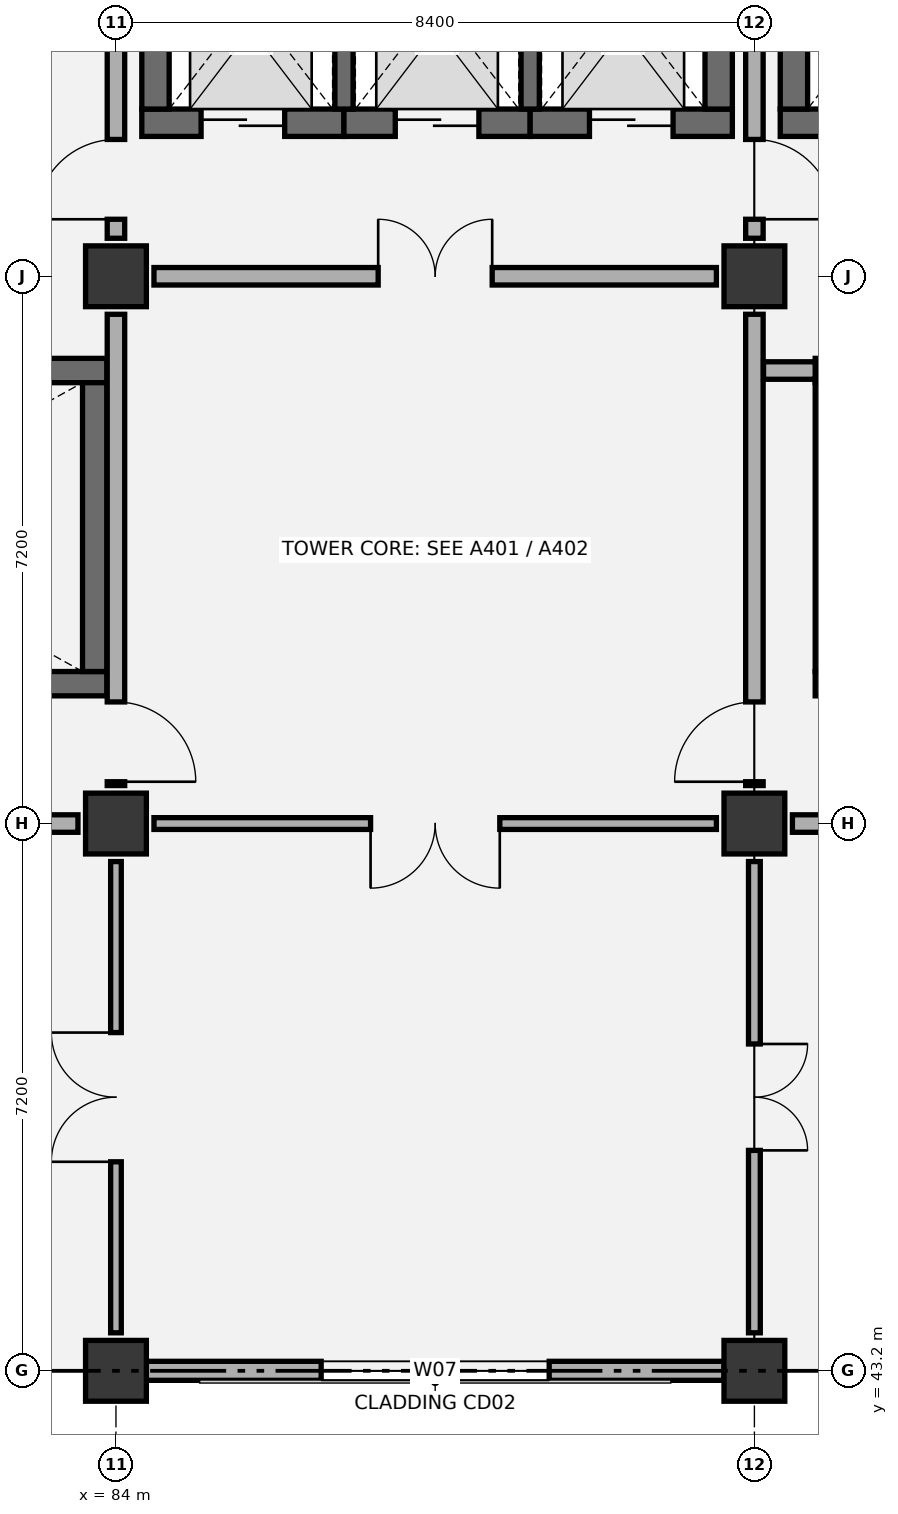
"""IFC4 building model, lengths in metres.
Left out: names, types, materials, properties, quantities, classifications, styles, units other than length and angle.
Written with IfcOpenShell. Run it as: python <this file> out.ifc"""

import sys

from ifc_helpers import new_model, si_unit, direction, frame, frame_2d, origin, origin_2d, place, context, subcontext, project, spatial, rectangle, extrude, element, fill, save


model = new_model("IFC4")
c1 = context("Model", 3, precision=1e-05, world=origin(), true_north=direction((0.0, 1.0)))
c2 = subcontext(c1, "Body", "Model", "MODEL_VIEW")
j1 = project(units=[si_unit("LENGTHUNIT", "METRE"), si_unit("PLANEANGLEUNIT", "RADIAN")], contexts=[c1])
p1 = place(None, origin())
s1 = spatial("IfcSite", under=j1, at=p1, CompositionType="ELEMENT")
p2 = place(p1, origin())
s2 = spatial("IfcBuilding", under=s1, at=p2, CompositionType="ELEMENT")
p3 = place(p2, frame((0.0, 0.0, 11.4)))
s3 = spatial("IfcBuildingStorey", under=s2, at=p3, CompositionType="ELEMENT", Elevation=11.4)
for number, where, z_axis, x_axis in (
    (1, (84.0, 43.2, 0.0), (0.0, 0.0, 1.0), (1.0, 0.0, 0.0)),
    (2, (84.0, 50.4, 0.0), (0.0, 0.0, 1.0), (1.0, 0.0, 0.0)),
    (3, (84.0, 57.6, 0.0), (0.0, 0.0, 1.0), (1.0, 0.0, 0.0)),
    (4, (92.4, 43.2, 0.0), (0.0, 0.0, 1.0), (1.0, 0.0, 0.0)),
    (5, (92.4, 50.4, 0.0), (0.0, 0.0, 1.0), (1.0, 0.0, 0.0)),
    (6, (92.4, 57.6, 0.0), (0.0, 0.0, 1.0), (1.0, 0.0, 0.0)),
):
    element("IfcColumn", number, at=place(p3, frame(where, z_axis=z_axis, x_axis=x_axis)), inside=s3, PredefinedType="COLUMN", context=c2, shape_type="SweptSolid", body=[
        extrude(rectangle(XDim=0.8, YDim=0.8, at=origin_2d()), origin(), (0.0, 0.0, 1.0), 5.4),
    ])
p4 = place(p3, frame((76.4, 52.24, 0.0), z_axis=(0.0, 0.0, 1.0), x_axis=(1.0, 0.0, 0.0)))
e7 = element("IfcWall", 7, at=p4, inside=s3, PredefinedType="SHEAR", context=c2, shape_type="SweptSolid", body=[
    extrude(rectangle(XDim=7.48, YDim=0.32, at=frame_2d((3.74, 0.0))), origin(), (0.0, 0.0, 1.0), 5.1),
])
p5 = place(p4, frame((0.45, 0.0, 0.0)))
e8 = element("IfcOpeningElement", 8, at=p5, cuts=e7, PredefinedType="OPENING", context=c2, shape_type="SweptSolid", body=[
    extrude(rectangle(XDim=1.05, YDim=2.15, at=frame_2d((0.525, 1.075))), frame((0.0, 0.17, 0.0), z_axis=(0.0, -1.0, 0.0), x_axis=(1.0, 0.0, 0.0)), (0.0, 0.0, 1.0), 0.34),
])
p6 = place(p3, frame((76.4, 56.36, 0.0), z_axis=(0.0, 0.0, 1.0), x_axis=(1.0, 0.0, 0.0)))
e9 = element("IfcWall", 9, at=p6, inside=s3, PredefinedType="SHEAR", context=c2, shape_type="SweptSolid", body=[
    extrude(rectangle(XDim=7.48, YDim=0.32, at=frame_2d((3.74, 0.0))), origin(), (0.0, 0.0, 1.0), 5.1),
])
p7 = place(p3, frame((83.72, 52.4, 0.0), z_axis=(0.0, 0.0, 1.0), x_axis=(0.0, 1.0, 0.0)))
e10 = element("IfcWall", 10, at=p7, inside=s3, PredefinedType="SHEAR", context=c2, shape_type="SweptSolid", body=[
    extrude(rectangle(XDim=3.8, YDim=0.32, at=frame_2d((1.9, 0.0))), origin(), (0.0, 0.0, 1.0), 5.1),
])
p8 = place(p3, frame((93.2, 52.24, 0.0), z_axis=(0.0, 0.0, 1.0), x_axis=(1.0, 0.0, 0.0)))
e11 = element("IfcWall", 11, at=p8, inside=s3, PredefinedType="SHEAR", context=c2, shape_type="SweptSolid", body=[
    extrude(rectangle(XDim=7.48, YDim=0.32, at=frame_2d((3.74, 0.0))), origin(), (0.0, 0.0, 1.0), 5.1),
])
p9 = place(p8, frame((0.45, 0.0, 0.0)))
e12 = element("IfcOpeningElement", 12, at=p9, cuts=e11, PredefinedType="OPENING", context=c2, shape_type="SweptSolid", body=[
    extrude(rectangle(XDim=1.05, YDim=2.15, at=frame_2d((0.525, 1.075))), frame((0.0, 0.17, 0.0), z_axis=(0.0, -1.0, 0.0), x_axis=(1.0, 0.0, 0.0)), (0.0, 0.0, 1.0), 0.34),
])
p10 = place(p3, frame((93.2, 56.36, 0.0), z_axis=(0.0, 0.0, 1.0), x_axis=(1.0, 0.0, 0.0)))
e13 = element("IfcWall", 13, at=p10, inside=s3, PredefinedType="SHEAR", context=c2, shape_type="SweptSolid", body=[
    extrude(rectangle(XDim=7.48, YDim=0.32, at=frame_2d((3.74, 0.0))), origin(), (0.0, 0.0, 1.0), 5.1),
])
p11 = place(p3, frame((93.36, 52.4, 0.0), z_axis=(0.0, 0.0, 1.0), x_axis=(0.0, 1.0, 0.0)))
e14 = element("IfcWall", 14, at=p11, inside=s3, PredefinedType="SHEAR", context=c2, shape_type="SweptSolid", body=[
    extrude(rectangle(XDim=3.8, YDim=0.32, at=frame_2d((1.9, 0.0))), origin(), (0.0, 0.0, 1.0), 5.1),
])
p12 = place(p3, frame((84.34, 59.62, 0.0), z_axis=(0.0, 0.0, 1.0), x_axis=(1.0, 0.0, 0.0)))
e15 = element("IfcWall", 15, at=p12, inside=s3, PredefinedType="SHEAR", context=c2, shape_type="SweptSolid", body=[
    extrude(rectangle(XDim=2.66, YDim=0.36, at=frame_2d((1.33, 0.0))), origin(), (0.0, 0.0, 1.0), 5.1),
])
p13 = place(p12, frame((0.78, 0.0, 0.0)))
e16 = element("IfcOpeningElement", 16, at=p13, cuts=e15, PredefinedType="OPENING", context=c2, shape_type="SweptSolid", body=[
    extrude(rectangle(XDim=1.1, YDim=2.15, at=frame_2d((0.55, 1.075))), frame((0.0, 0.19, 0.0), z_axis=(0.0, -1.0, 0.0), x_axis=(1.0, 0.0, 0.0)), (0.0, 0.0, 1.0), 0.38),
])
p14 = place(p3, frame((87.0, 59.62, 0.0), z_axis=(0.0, 0.0, 1.0), x_axis=(1.0, 0.0, 0.0)))
e17 = element("IfcWall", 17, at=p14, inside=s3, PredefinedType="SHEAR", context=c2, shape_type="SweptSolid", body=[
    extrude(rectangle(XDim=2.45, YDim=0.36, at=frame_2d((1.225, 0.0))), origin(), (0.0, 0.0, 1.0), 5.1),
])
p15 = place(p14, frame((0.675, 0.0, 0.0)))
e18 = element("IfcOpeningElement", 18, at=p15, cuts=e17, PredefinedType="OPENING", context=c2, shape_type="SweptSolid", body=[
    extrude(rectangle(XDim=1.1, YDim=2.15, at=frame_2d((0.55, 1.075))), frame((0.0, 0.19, 0.0), z_axis=(0.0, -1.0, 0.0), x_axis=(1.0, 0.0, 0.0)), (0.0, 0.0, 1.0), 0.38),
])
p16 = place(p3, frame((89.45, 59.62, 0.0), z_axis=(0.0, 0.0, 1.0), x_axis=(1.0, 0.0, 0.0)))
e19 = element("IfcWall", 19, at=p16, inside=s3, PredefinedType="SHEAR", context=c2, shape_type="SweptSolid", body=[
    extrude(rectangle(XDim=2.66, YDim=0.36, at=frame_2d((1.33, 0.0))), origin(), (0.0, 0.0, 1.0), 5.1),
])
p17 = place(p16, frame((0.78, 0.0, 0.0)))
e20 = element("IfcOpeningElement", 20, at=p17, cuts=e19, PredefinedType="OPENING", context=c2, shape_type="SweptSolid", body=[
    extrude(rectangle(XDim=1.1, YDim=2.15, at=frame_2d((0.55, 1.075))), frame((0.0, 0.19, 0.0), z_axis=(0.0, -1.0, 0.0), x_axis=(1.0, 0.0, 0.0)), (0.0, 0.0, 1.0), 0.38),
])
for number, where, z_axis, x_axis in (
    (21, (84.52, 59.8, 0.0), (0.0, 0.0, 1.0), (0.0, 1.0, 0.0)),
    (22, (91.93, 59.8, 0.0), (0.0, 0.0, 1.0), (0.0, 1.0, 0.0)),
):
    element("IfcWall", number, at=place(p3, frame(where, z_axis=z_axis, x_axis=x_axis)), inside=s3, PredefinedType="SHEAR", context=c2, shape_type="SweptSolid", body=[
        extrude(rectangle(XDim=2.8, YDim=0.36, at=frame_2d((1.4, 0.0))), origin(), (0.0, 0.0, 1.0), 5.1),
    ])
for number, where, z_axis, x_axis in (
    (23, (87.0, 59.8, 0.0), (0.0, 0.0, 1.0), (0.0, 1.0, 0.0)),
    (24, (89.45, 59.8, 0.0), (0.0, 0.0, 1.0), (0.0, 1.0, 0.0)),
):
    element("IfcWall", number, at=place(p3, frame(where, z_axis=z_axis, x_axis=x_axis)), inside=s3, PredefinedType="SHEAR", context=c2, shape_type="SweptSolid", body=[
        extrude(rectangle(XDim=2.8, YDim=0.24, at=frame_2d((1.4, 0.0))), origin(), (0.0, 0.0, 1.0), 5.1),
    ])
p18 = place(p3, frame((92.74, 59.62, 0.0), z_axis=(0.0, 0.0, 1.0), x_axis=(1.0, 0.0, 0.0)))
e25 = element("IfcWall", 25, at=p18, inside=s3, PredefinedType="SHEAR", context=c2, shape_type="SweptSolid", body=[
    extrude(rectangle(XDim=2.87, YDim=0.36, at=frame_2d((1.435, 0.0))), origin(), (0.0, 0.0, 1.0), 5.1),
])
p19 = place(p18, frame((0.76, 0.0, 0.0)))
e26 = element("IfcOpeningElement", 26, at=p19, cuts=e25, PredefinedType="OPENING", context=c2, shape_type="SweptSolid", body=[
    extrude(rectangle(XDim=1.35, YDim=2.2, at=frame_2d((0.675, 1.1))), frame((0.0, 0.19, 0.0), z_axis=(0.0, -1.0, 0.0), x_axis=(1.0, 0.0, 0.0)), (0.0, 0.0, 1.0), 0.38),
])
p20 = place(p3, frame((92.92, 59.8, 0.0), z_axis=(0.0, 0.0, 1.0), x_axis=(0.0, 1.0, 0.0)))
e27 = element("IfcWall", 27, at=p20, inside=s3, PredefinedType="SHEAR", context=c2, shape_type="SweptSolid", body=[
    extrude(rectangle(XDim=2.8, YDim=0.36, at=frame_2d((1.4, 0.0))), origin(), (0.0, 0.0, 1.0), 5.1),
])
p21 = place(p3, frame((84.4, 43.2, 0.0), z_axis=(0.0, 0.0, 1.0), x_axis=(1.0, 0.0, 0.0)))
e28 = element("IfcWall", 28, at=p21, inside=s3, PredefinedType="SOLIDWALL", context=c2, shape_type="SweptSolid", body=[
    extrude(rectangle(XDim=7.6, YDim=0.25, at=frame_2d((3.8, 0.0))), origin(), (0.0, 0.0, 1.0), 4.445),
])
p22 = place(p21, frame((2.3, 0.0, 0.9)))
e29 = element("IfcOpeningElement", 29, at=p22, cuts=e28, PredefinedType="OPENING", context=c2, shape_type="SweptSolid", body=[
    extrude(rectangle(XDim=3.0, YDim=2.1, at=frame_2d((1.5, 1.05))), frame((0.0, 0.135, 0.0), z_axis=(0.0, -1.0, 0.0), x_axis=(1.0, 0.0, 0.0)), (0.0, 0.0, 1.0), 0.27),
])
p23 = place(p3, frame((84.0, 43.7, 0.0), z_axis=(0.0, 0.0, 1.0), x_axis=(0.0, 1.0, 0.0)))
e30 = element("IfcWall", 30, at=p23, inside=s3, PredefinedType="PARTITIONING", context=c2, shape_type="SweptSolid", body=[
    extrude(rectangle(XDim=6.2, YDim=0.14, at=frame_2d((3.1, 0.0))), origin(), (0.0, 0.0, 1.0), 4.695),
])
p24 = place(p23, frame((2.25, 0.0, 0.0)))
e31 = element("IfcOpeningElement", 31, at=p24, cuts=e30, PredefinedType="OPENING", context=c2, shape_type="SweptSolid", body=[
    extrude(rectangle(XDim=1.7, YDim=2.25, at=frame_2d((0.85, 1.125))), frame((0.0, 0.08, 0.0), z_axis=(0.0, -1.0, 0.0), x_axis=(1.0, 0.0, 0.0)), (0.0, 0.0, 1.0), 0.16),
])
p25 = place(p3, frame((76.1, 50.4, 0.0), z_axis=(0.0, 0.0, 1.0), x_axis=(1.0, 0.0, 0.0)))
e32 = element("IfcWall", 32, at=p25, inside=s3, PredefinedType="PARTITIONING", context=c2, shape_type="SweptSolid", body=[
    extrude(rectangle(XDim=7.4, YDim=0.23, at=frame_2d((3.7, 0.0))), origin(), (0.0, 0.0, 1.0), 4.345),
])
p26 = place(p25, frame((2.95, 0.0, 0.0)))
e33 = element("IfcOpeningElement", 33, at=p26, cuts=e32, PredefinedType="OPENING", context=c2, shape_type="SweptSolid", body=[
    extrude(rectangle(XDim=1.5, YDim=2.15, at=frame_2d((0.75, 1.075))), frame((0.0, 0.125, 0.0), z_axis=(0.0, -1.0, 0.0), x_axis=(1.0, 0.0, 0.0)), (0.0, 0.0, 1.0), 0.25),
])
p27 = place(p3, frame((84.0, 50.9, 0.0), z_axis=(0.0, 0.0, 1.0), x_axis=(0.0, 1.0, 0.0)))
e34 = element("IfcWall", 34, at=p27, inside=s3, PredefinedType="PARTITIONING", context=c2, shape_type="SweptSolid", body=[
    extrude(rectangle(XDim=6.2, YDim=0.23, at=frame_2d((3.1, 0.0))), origin(), (0.0, 0.0, 1.0), 4.395),
])
p28 = place(p27, frame((0.05, 0.0, 0.0)))
e35 = element("IfcOpeningElement", 35, at=p28, cuts=e34, PredefinedType="OPENING", context=c2, shape_type="SweptSolid", body=[
    extrude(rectangle(XDim=1.05, YDim=2.15, at=frame_2d((0.525, 1.075))), frame((0.0, 0.125, 0.0), z_axis=(0.0, -1.0, 0.0), x_axis=(1.0, 0.0, 0.0)), (0.0, 0.0, 1.0), 0.25),
])
p29 = place(p3, frame((84.0, 58.1, 0.0), z_axis=(0.0, 0.0, 1.0), x_axis=(0.0, 1.0, 0.0)))
e36 = element("IfcWall", 36, at=p29, inside=s3, PredefinedType="PARTITIONING", context=c2, shape_type="SweptSolid", body=[
    extrude(rectangle(XDim=6.2, YDim=0.23, at=frame_2d((3.1, 0.0))), origin(), (0.0, 0.0, 1.0), 4.805),
])
p30 = place(p29, frame((0.25, 0.0, 0.0)))
e37 = element("IfcOpeningElement", 37, at=p30, cuts=e36, PredefinedType="OPENING", context=c2, shape_type="SweptSolid", body=[
    extrude(rectangle(XDim=1.05, YDim=2.15, at=frame_2d((0.525, 1.075))), frame((0.0, 0.125, 0.0), z_axis=(0.0, -1.0, 0.0), x_axis=(1.0, 0.0, 0.0)), (0.0, 0.0, 1.0), 0.25),
])
p31 = place(p3, frame((92.4, 43.7, 0.0), z_axis=(0.0, 0.0, 1.0), x_axis=(0.0, 1.0, 0.0)))
e38 = element("IfcWall", 38, at=p31, inside=s3, PredefinedType="PARTITIONING", context=c2, shape_type="SweptSolid", body=[
    extrude(rectangle(XDim=6.2, YDim=0.155, at=frame_2d((3.1, 0.0))), origin(), (0.0, 0.0, 1.0), 4.395),
])
p32 = place(p31, frame((2.4, 0.0, 0.0)))
e39 = element("IfcOpeningElement", 39, at=p32, cuts=e38, PredefinedType="OPENING", context=c2, shape_type="SweptSolid", body=[
    extrude(rectangle(XDim=1.4, YDim=2.15, at=frame_2d((0.7, 1.075))), frame((0.0, 0.087, 0.0), z_axis=(0.0, -1.0, 0.0), x_axis=(1.0, 0.0, 0.0)), (0.0, 0.0, 1.0), 0.175),
])
p33 = place(p3, frame((84.5, 50.4, 0.0), z_axis=(0.0, 0.0, 1.0), x_axis=(1.0, 0.0, 0.0)))
e40 = element("IfcWall", 40, at=p33, inside=s3, PredefinedType="PARTITIONING", context=c2, shape_type="SweptSolid", body=[
    extrude(rectangle(XDim=7.4, YDim=0.155, at=frame_2d((3.7, 0.0))), origin(), (0.0, 0.0, 1.0), 4.345),
])
p34 = place(p33, frame((2.85, 0.0, 0.0)))
e41 = element("IfcOpeningElement", 41, at=p34, cuts=e40, PredefinedType="OPENING", context=c2, shape_type="SweptSolid", body=[
    extrude(rectangle(XDim=1.7, YDim=2.25, at=frame_2d((0.85, 1.125))), frame((0.0, 0.087, 0.0), z_axis=(0.0, -1.0, 0.0), x_axis=(1.0, 0.0, 0.0)), (0.0, 0.0, 1.0), 0.175),
])
p35 = place(p3, frame((92.4, 50.9, 0.0), z_axis=(0.0, 0.0, 1.0), x_axis=(0.0, 1.0, 0.0)))
e42 = element("IfcWall", 42, at=p35, inside=s3, PredefinedType="PARTITIONING", context=c2, shape_type="SweptSolid", body=[
    extrude(rectangle(XDim=6.2, YDim=0.23, at=frame_2d((3.1, 0.0))), origin(), (0.0, 0.0, 1.0), 4.805),
])
p36 = place(p35, frame((0.05, 0.0, 0.0)))
e43 = element("IfcOpeningElement", 43, at=p36, cuts=e42, PredefinedType="OPENING", context=c2, shape_type="SweptSolid", body=[
    extrude(rectangle(XDim=1.05, YDim=2.15, at=frame_2d((0.525, 1.075))), frame((0.0, 0.125, 0.0), z_axis=(0.0, -1.0, 0.0), x_axis=(1.0, 0.0, 0.0)), (0.0, 0.0, 1.0), 0.25),
])
p37 = place(p3, frame((84.5, 57.6, 0.0), z_axis=(0.0, 0.0, 1.0), x_axis=(1.0, 0.0, 0.0)))
e44 = element("IfcWall", 44, at=p37, inside=s3, PredefinedType="PARTITIONING", context=c2, shape_type="SweptSolid", body=[
    extrude(rectangle(XDim=7.4, YDim=0.23, at=frame_2d((3.7, 0.0))), origin(), (0.0, 0.0, 1.0), 4.345),
])
p38 = place(p37, frame((2.95, 0.0, 0.0)))
e45 = element("IfcOpeningElement", 45, at=p38, cuts=e44, PredefinedType="OPENING", context=c2, shape_type="SweptSolid", body=[
    extrude(rectangle(XDim=1.5, YDim=2.15, at=frame_2d((0.75, 1.075))), frame((0.0, 0.125, 0.0), z_axis=(0.0, -1.0, 0.0), x_axis=(1.0, 0.0, 0.0)), (0.0, 0.0, 1.0), 0.25),
])
p39 = place(p3, frame((92.4, 58.1, 0.0), z_axis=(0.0, 0.0, 1.0), x_axis=(0.0, 1.0, 0.0)))
e46 = element("IfcWall", 46, at=p39, inside=s3, PredefinedType="PARTITIONING", context=c2, shape_type="SweptSolid", body=[
    extrude(rectangle(XDim=6.2, YDim=0.23, at=frame_2d((3.1, 0.0))), origin(), (0.0, 0.0, 1.0), 4.395),
])
p40 = place(p39, frame((0.25, 0.0, 0.0)))
e47 = element("IfcOpeningElement", 47, at=p40, cuts=e46, PredefinedType="OPENING", context=c2, shape_type="SweptSolid", body=[
    extrude(rectangle(XDim=1.05, YDim=2.15, at=frame_2d((0.525, 1.075))), frame((0.0, 0.125, 0.0), z_axis=(0.0, -1.0, 0.0), x_axis=(1.0, 0.0, 0.0)), (0.0, 0.0, 1.0), 0.25),
])
p41 = place(p3, frame((92.9, 50.4, 0.0), z_axis=(0.0, 0.0, 1.0), x_axis=(1.0, 0.0, 0.0)))
e48 = element("IfcWall", 48, at=p41, inside=s3, PredefinedType="PARTITIONING", context=c2, shape_type="SweptSolid", body=[
    extrude(rectangle(XDim=7.4, YDim=0.23, at=frame_2d((3.7, 0.0))), origin(), (0.0, 0.0, 1.0), 4.345),
])
p42 = place(p41, frame((2.95, 0.0, 0.0)))
e49 = element("IfcOpeningElement", 49, at=p42, cuts=e48, PredefinedType="OPENING", context=c2, shape_type="SweptSolid", body=[
    extrude(rectangle(XDim=1.5, YDim=2.15, at=frame_2d((0.75, 1.075))), frame((0.0, 0.125, 0.0), z_axis=(0.0, -1.0, 0.0), x_axis=(1.0, 0.0, 0.0)), (0.0, 0.0, 1.0), 0.25),
])
p43 = place(p3, frame((92.52, 56.36, 0.0), z_axis=(0.0, 0.0, 1.0), x_axis=(1.0, 0.0, 0.0)))
e50 = element("IfcWall", 50, at=p43, inside=s3, PredefinedType="PARTITIONING", context=c2, shape_type="SweptSolid", body=[
    extrude(rectangle(XDim=0.68, YDim=0.23, at=frame_2d((0.34, 0.0))), origin(), (0.0, 0.0, 1.0), 5.1),
])
p44 = place(p22, origin())
e51 = element("IfcWindow", 51, at=p44, inside=s3, PartitioningType="SINGLE_PANEL", PredefinedType="WINDOW", context=c2, shape_type="SweptSolid", body=[
    extrude(rectangle(XDim=3.0, YDim=2.1, at=frame_2d((1.5, 1.05))), frame((0.0, 0.03, 0.0), z_axis=(0.0, -1.0, 0.0), x_axis=(1.0, 0.0, 0.0)), (0.0, 0.0, 1.0), 0.06),
])
fill(e29, e51)
p45 = place(p13, origin())
e52 = element("IfcDoor", 52, at=p45, inside=s3, OperationType="DOUBLE_DOOR_SLIDING", PredefinedType="DOOR", context=c2, shape_type="SweptSolid", body=[
    extrude(rectangle(XDim=1.1, YDim=2.15, at=frame_2d((0.55, 1.075))), frame((0.0, 0.025, 0.0), z_axis=(0.0, -1.0, 0.0), x_axis=(1.0, 0.0, 0.0)), (0.0, 0.0, 1.0), 0.05),
])
fill(e16, e52)
p46 = place(p15, origin())
e53 = element("IfcDoor", 53, at=p46, inside=s3, OperationType="DOUBLE_DOOR_SLIDING", PredefinedType="DOOR", context=c2, shape_type="SweptSolid", body=[
    extrude(rectangle(XDim=1.1, YDim=2.15, at=frame_2d((0.55, 1.075))), frame((0.0, 0.025, 0.0), z_axis=(0.0, -1.0, 0.0), x_axis=(1.0, 0.0, 0.0)), (0.0, 0.0, 1.0), 0.05),
])
fill(e18, e53)
p47 = place(p17, origin())
e54 = element("IfcDoor", 54, at=p47, inside=s3, OperationType="DOUBLE_DOOR_SLIDING", PredefinedType="DOOR", context=c2, shape_type="SweptSolid", body=[
    extrude(rectangle(XDim=1.1, YDim=2.15, at=frame_2d((0.55, 1.075))), frame((0.0, 0.025, 0.0), z_axis=(0.0, -1.0, 0.0), x_axis=(1.0, 0.0, 0.0)), (0.0, 0.0, 1.0), 0.05),
])
fill(e20, e54)
p48 = place(p24, origin())
e55 = element("IfcDoor", 55, at=p48, inside=s3, OperationType="DOUBLE_DOOR_SINGLE_SWING", PredefinedType="DOOR", context=c2, shape_type="SweptSolid", body=[
    extrude(rectangle(XDim=1.7, YDim=2.25, at=frame_2d((0.85, 1.125))), frame((0.0, 0.025, 0.0), z_axis=(0.0, -1.0, 0.0), x_axis=(1.0, 0.0, 0.0)), (0.0, 0.0, 1.0), 0.05),
])
fill(e31, e55)
p49 = place(p28, frame((1.05, 0.0, 0.0), z_axis=(0.0, 0.0, 1.0), x_axis=(-1.0, 0.0, 0.0)))
e56 = element("IfcDoor", 56, at=p49, inside=s3, OperationType="SINGLE_SWING_RIGHT", PredefinedType="DOOR", context=c2, shape_type="SweptSolid", body=[
    extrude(rectangle(XDim=1.05, YDim=2.15, at=frame_2d((0.525, 1.075))), frame((0.0, 0.025, 0.0), z_axis=(0.0, -1.0, 0.0), x_axis=(1.0, 0.0, 0.0)), (0.0, 0.0, 1.0), 0.05),
])
fill(e35, e56)
p50 = place(p30, origin())
e57 = element("IfcDoor", 57, at=p50, inside=s3, OperationType="SINGLE_SWING_LEFT", PredefinedType="DOOR", context=c2, shape_type="SweptSolid", body=[
    extrude(rectangle(XDim=1.05, YDim=2.15, at=frame_2d((0.525, 1.075))), frame((0.0, 0.025, 0.0), z_axis=(0.0, -1.0, 0.0), x_axis=(1.0, 0.0, 0.0)), (0.0, 0.0, 1.0), 0.05),
])
fill(e37, e57)
p51 = place(p32, frame((1.4, 0.0, 0.0), z_axis=(0.0, 0.0, 1.0), x_axis=(-1.0, 0.0, 0.0)))
e58 = element("IfcDoor", 58, at=p51, inside=s3, OperationType="DOUBLE_DOOR_SINGLE_SWING", PredefinedType="DOOR", context=c2, shape_type="SweptSolid", body=[
    extrude(rectangle(XDim=1.4, YDim=2.15, at=frame_2d((0.7, 1.075))), frame((0.0, 0.025, 0.0), z_axis=(0.0, -1.0, 0.0), x_axis=(1.0, 0.0, 0.0)), (0.0, 0.0, 1.0), 0.05),
])
fill(e39, e58)
p52 = place(p34, frame((1.7, 0.0, 0.0), z_axis=(0.0, 0.0, 1.0), x_axis=(-1.0, 0.0, 0.0)))
e59 = element("IfcDoor", 59, at=p52, inside=s3, OperationType="DOUBLE_DOOR_SINGLE_SWING", PredefinedType="DOOR", context=c2, shape_type="SweptSolid", body=[
    extrude(rectangle(XDim=1.7, YDim=2.25, at=frame_2d((0.85, 1.125))), frame((0.0, 0.025, 0.0), z_axis=(0.0, -1.0, 0.0), x_axis=(1.0, 0.0, 0.0)), (0.0, 0.0, 1.0), 0.05),
])
fill(e41, e59)
p53 = place(p36, origin())
e60 = element("IfcDoor", 60, at=p53, inside=s3, OperationType="SINGLE_SWING_LEFT", PredefinedType="DOOR", context=c2, shape_type="SweptSolid", body=[
    extrude(rectangle(XDim=1.05, YDim=2.15, at=frame_2d((0.525, 1.075))), frame((0.0, 0.025, 0.0), z_axis=(0.0, -1.0, 0.0), x_axis=(1.0, 0.0, 0.0)), (0.0, 0.0, 1.0), 0.05),
])
fill(e43, e60)
p54 = place(p38, origin())
e61 = element("IfcDoor", 61, at=p54, inside=s3, OperationType="DOUBLE_DOOR_SINGLE_SWING", PredefinedType="DOOR", context=c2, shape_type="SweptSolid", body=[
    extrude(rectangle(XDim=1.5, YDim=2.15, at=frame_2d((0.75, 1.075))), frame((0.0, 0.025, 0.0), z_axis=(0.0, -1.0, 0.0), x_axis=(1.0, 0.0, 0.0)), (0.0, 0.0, 1.0), 0.05),
])
fill(e45, e61)
p55 = place(p40, frame((1.05, 0.0, 0.0), z_axis=(0.0, 0.0, 1.0), x_axis=(-1.0, 0.0, 0.0)))
e62 = element("IfcDoor", 62, at=p55, inside=s3, OperationType="SINGLE_SWING_RIGHT", PredefinedType="DOOR", context=c2, shape_type="SweptSolid", body=[
    extrude(rectangle(XDim=1.05, YDim=2.15, at=frame_2d((0.525, 1.075))), frame((0.0, 0.025, 0.0), z_axis=(0.0, -1.0, 0.0), x_axis=(1.0, 0.0, 0.0)), (0.0, 0.0, 1.0), 0.05),
])
fill(e47, e62)
save(model, sys.argv[1])
